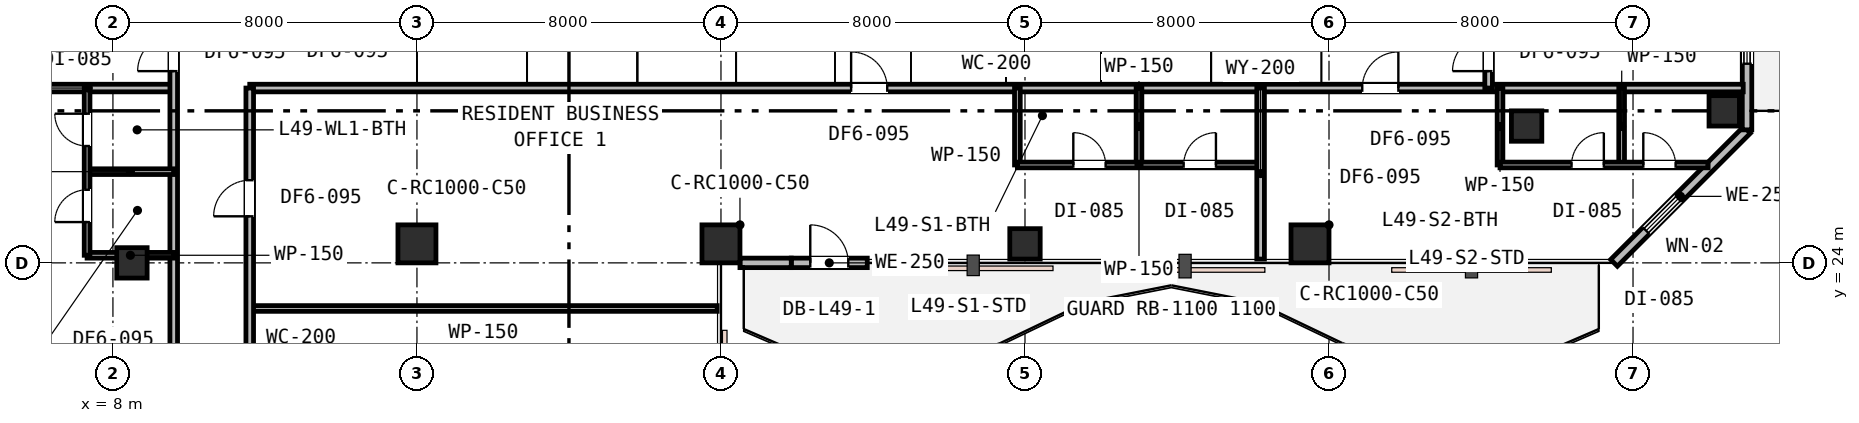
"""IFC4 building model, lengths in metres.
Left out: names, types, materials, properties, quantities, classifications, styles, units other than length and angle.
Written with IfcOpenShell. Run it as: python <this file> out.ifc"""

import sys

from ifc_helpers import new_model, si_unit, direction, frame, frame_2d, origin, origin_2d, place, context, subcontext, project, spatial, rectangle, extrude, element, fill, save


model = new_model("IFC4")
c1 = context("Model", 3, precision=1e-05, world=origin(), true_north=direction((0.0, 1.0)))
c2 = subcontext(c1, "Body", "Model", "MODEL_VIEW")
j1 = project(units=[si_unit("LENGTHUNIT", "METRE"), si_unit("PLANEANGLEUNIT", "RADIAN")], contexts=[c1])
p1 = place(None, origin())
s1 = spatial("IfcSite", under=j1, at=p1, CompositionType="ELEMENT")
p2 = place(p1, origin())
s2 = spatial("IfcBuilding", under=s1, at=p2, CompositionType="ELEMENT")
p3 = place(p2, frame((0.0, 0.0, 190.2)))
s3 = spatial("IfcBuildingStorey", under=s2, at=p3, CompositionType="ELEMENT", Elevation=190.2)
p4 = place(p3, frame((8.5, 24.0, 0.0), z_axis=(0.0, 0.0, 1.0), x_axis=(1.0, 0.0, 0.0)))
e1 = element("IfcColumn", 1, at=p4, inside=s3, PredefinedType="COLUMN", context=c2, shape_type="SweptSolid", body=[
    extrude(rectangle(XDim=0.8, YDim=0.8, at=origin_2d()), origin(), (0.0, 0.0, 1.0), 3.6),
])
for number, where, z_axis, x_axis in (
    (2, (16.0, 24.5, 0.0), (0.0, 0.0, 1.0), (1.0, 0.0, 0.0)),
    (3, (24.0, 24.5, 0.0), (0.0, 0.0, 1.0), (1.0, 0.0, 0.0)),
):
    element("IfcColumn", number, at=place(p3, frame(where, z_axis=z_axis, x_axis=x_axis)), inside=s3, PredefinedType="COLUMN", context=c2, shape_type="SweptSolid", body=[
        extrude(rectangle(XDim=1.0, YDim=1.0, at=origin_2d()), origin(), (0.0, 0.0, 1.0), 3.6),
    ])
p5 = place(p3, frame((32.0, 24.5, 0.0), z_axis=(0.0, 0.0, 1.0), x_axis=(1.0, 0.0, 0.0)))
e4 = element("IfcColumn", 4, at=p5, inside=s3, PredefinedType="COLUMN", context=c2, shape_type="SweptSolid", body=[
    extrude(rectangle(XDim=0.8, YDim=0.8, at=origin_2d()), origin(), (0.0, 0.0, 1.0), 3.6),
])
p6 = place(p3, frame((39.5, 24.5, 0.0), z_axis=(0.0, 0.0, 1.0), x_axis=(1.0, 0.0, 0.0)))
e5 = element("IfcColumn", 5, at=p6, inside=s3, PredefinedType="COLUMN", context=c2, shape_type="SweptSolid", body=[
    extrude(rectangle(XDim=1.0, YDim=1.0, at=origin_2d()), origin(), (0.0, 0.0, 1.0), 3.6),
])
for number, where, z_axis, x_axis in (
    (6, (45.2, 27.6, 0.0), (0.0, 0.0, 1.0), (1.0, 0.0, 0.0)),
    (7, (50.4, 28.0, 0.0), (0.0, 0.0, 1.0), (1.0, 0.0, 0.0)),
):
    element("IfcColumn", number, at=place(p3, frame(where, z_axis=z_axis, x_axis=x_axis)), inside=s3, PredefinedType="COLUMN", context=c2, shape_type="SweptSolid", body=[
        extrude(rectangle(XDim=0.8, YDim=0.8, at=origin_2d()), origin(), (0.0, 0.0, 1.0), 3.6),
    ])
p7 = place(p3, frame((25.85, 24.0, 0.0), z_axis=(0.0, 0.0, 1.0), x_axis=(1.0, 0.0, 0.0)))
e8 = element("IfcWall", 8, at=p7, inside=s3, PredefinedType="STANDARD", context=c2, shape_type="SweptSolid", body=[
    extrude(rectangle(XDim=2.0, YDim=0.25, at=frame_2d((1.0, 0.0))), origin(), (0.0, 0.0, 1.0), 3.02),
])
p8 = place(p7, frame((0.5, 0.0, 0.0)))
e9 = element("IfcOpeningElement", 9, at=p8, cuts=e8, PredefinedType="OPENING", context=c2, shape_type="SweptSolid", body=[
    extrude(rectangle(XDim=1.0, YDim=2.15, at=frame_2d((0.5, 1.075))), frame((0.0, 0.135, 0.0), z_axis=(0.0, -1.0, 0.0), x_axis=(1.0, 0.0, 0.0)), (0.0, 0.0, 1.0), 0.27),
])
p9 = place(p3, frame((24.5, 24.0, 0.0), z_axis=(0.0, 0.0, 1.0), x_axis=(1.0, 0.0, 0.0)))
e10 = element("IfcWall", 10, at=p9, inside=s3, PredefinedType="STANDARD", context=c2, shape_type="SweptSolid", body=[
    extrude(rectangle(XDim=1.35, YDim=0.25, at=frame_2d((0.675, 0.0))), origin(), (0.0, 0.0, 1.0), 3.02),
])
p10 = place(p3, frame((47.5, 24.0, 0.0), z_axis=(0.0, 0.0, 1.0), x_axis=(0.707106781187, 0.707106781187, 0.0)))
e11 = element("IfcWall", 11, at=p10, inside=s3, PredefinedType="STANDARD", context=c2, shape_type="SweptSolid", body=[
    extrude(rectangle(XDim=4.95, YDim=0.25, at=frame_2d((2.475, 0.0))), origin(), (0.0, 0.0, 1.0), 3.33),
])
p11 = place(p10, frame((1.196, 0.0, 0.85)))
e12 = element("IfcOpeningElement", 12, at=p11, cuts=e11, PredefinedType="OPENING", context=c2, shape_type="SweptSolid", body=[
    extrude(rectangle(XDim=1.2, YDim=1.6, at=frame_2d((0.6, 0.8))), frame((0.0, 0.135, 0.0), z_axis=(0.0, -1.0, 0.0), x_axis=(1.0, 0.0, 0.0)), (0.0, 0.0, 1.0), 0.27),
])
p12 = place(p3, frame((51.0, 27.5, 0.0), z_axis=(0.0, 0.0, 1.0), x_axis=(0.0, 1.0, 0.0)))
e13 = element("IfcWall", 13, at=p12, inside=s3, PredefinedType="STANDARD", context=c2, shape_type="SweptSolid", body=[
    extrude(rectangle(XDim=4.2, YDim=0.25, at=frame_2d((2.1, 0.0))), origin(), (0.0, 0.0, 1.0), 3.33),
])
p13 = place(p12, frame((1.74, 0.0, 0.75)))
e14 = element("IfcOpeningElement", 14, at=p13, cuts=e13, PredefinedType="OPENING", context=c2, shape_type="SweptSolid", body=[
    extrude(rectangle(XDim=1.8, YDim=1.85, at=frame_2d((0.9, 0.925))), frame((0.0, 0.135, 0.0), z_axis=(0.0, -1.0, 0.0), x_axis=(1.0, 0.0, 0.0)), (0.0, 0.0, 1.0), 0.27),
])
p14 = place(p3, frame((5.1, 28.6, 0.0), z_axis=(0.0, 0.0, 1.0), x_axis=(1.0, 0.0, 0.0)))
e15 = element("IfcWall", 15, at=p14, inside=s3, PredefinedType="PARTITIONING", context=c2, shape_type="SweptSolid", body=[
    extrude(rectangle(XDim=4.5, YDim=0.2, at=frame_2d((2.25, 0.0))), origin(), (0.0, 0.0, 1.0), 2.92),
])
p15 = place(p3, frame((11.6, 28.6, 0.0), z_axis=(0.0, 0.0, 1.0), x_axis=(1.0, 0.0, 0.0)))
e16 = element("IfcWall", 16, at=p15, inside=s3, PredefinedType="PARTITIONING", context=c2, shape_type="SweptSolid", body=[
    extrude(rectangle(XDim=39.3, YDim=0.2, at=frame_2d((19.65, 0.0))), origin(), (0.0, 0.0, 1.0), 2.92),
])
p16 = place(p15, frame((15.825, 0.0, 0.0)))
e17 = element("IfcOpeningElement", 17, at=p16, cuts=e16, PredefinedType="OPENING", context=c2, shape_type="SweptSolid", body=[
    extrude(rectangle(XDim=0.95, YDim=2.15, at=frame_2d((0.475, 1.075))), frame((0.0, 0.11, 0.0), z_axis=(0.0, -1.0, 0.0), x_axis=(1.0, 0.0, 0.0)), (0.0, 0.0, 1.0), 0.22),
])
p17 = place(p15, frame((29.275, 0.0, 0.0)))
e18 = element("IfcOpeningElement", 18, at=p17, cuts=e16, PredefinedType="OPENING", context=c2, shape_type="SweptSolid", body=[
    extrude(rectangle(XDim=0.95, YDim=2.15, at=frame_2d((0.475, 1.075))), frame((0.0, 0.11, 0.0), z_axis=(0.0, -1.0, 0.0), x_axis=(1.0, 0.0, 0.0)), (0.0, 0.0, 1.0), 0.22),
])
p18 = place(p3, frame((9.6, 17.0, 0.0), z_axis=(0.0, 0.0, 1.0), x_axis=(0.0, 1.0, 0.0)))
e19 = element("IfcWall", 19, at=p18, inside=s3, PredefinedType="PARTITIONING", context=c2, shape_type="SweptSolid", body=[
    extrude(rectangle(XDim=25.9, YDim=0.2, at=frame_2d((12.95, 0.0))), origin(), (0.0, 0.0, 1.0), 2.92),
])
p19 = place(p18, frame((12.045, 0.0, 0.0)))
e20 = element("IfcOpeningElement", 20, at=p19, cuts=e19, PredefinedType="OPENING", context=c2, shape_type="SweptSolid", body=[
    extrude(rectangle(XDim=0.95, YDim=2.15, at=frame_2d((0.475, 1.075))), frame((0.0, 0.11, 0.0), z_axis=(0.0, -1.0, 0.0), x_axis=(1.0, 0.0, 0.0)), (0.0, 0.0, 1.0), 0.22),
])
p20 = place(p18, frame((3.125, 0.0, 0.0)))
e21 = element("IfcOpeningElement", 21, at=p20, cuts=e19, PredefinedType="OPENING", context=c2, shape_type="SweptSolid", body=[
    extrude(rectangle(XDim=0.95, YDim=2.15, at=frame_2d((0.475, 1.075))), frame((0.0, 0.11, 0.0), z_axis=(0.0, -1.0, 0.0), x_axis=(1.0, 0.0, 0.0)), (0.0, 0.0, 1.0), 0.22),
])
p21 = place(p3, frame((44.2, 28.6, 0.0), z_axis=(0.0, 0.0, 1.0), x_axis=(0.0, 1.0, 0.0)))
e22 = element("IfcWall", 22, at=p21, inside=s3, PredefinedType="PARTITIONING", context=c2, shape_type="SweptSolid", body=[
    extrude(rectangle(XDim=14.3, YDim=0.2, at=frame_2d((7.15, 0.0))), origin(), (0.0, 0.0, 1.0), 2.92),
])
p22 = place(p21, frame((0.445, 0.0, 0.0)))
e23 = element("IfcOpeningElement", 23, at=p22, cuts=e22, PredefinedType="OPENING", context=c2, shape_type="SweptSolid", body=[
    extrude(rectangle(XDim=0.95, YDim=2.15, at=frame_2d((0.475, 1.075))), frame((0.0, 0.11, 0.0), z_axis=(0.0, -1.0, 0.0), x_axis=(1.0, 0.0, 0.0)), (0.0, 0.0, 1.0), 0.22),
])
p23 = place(p3, frame((31.8, 26.576, 0.0), z_axis=(0.0, 0.0, 1.0), x_axis=(0.0, 1.0, 0.0)))
e24 = element("IfcWall", 24, at=p23, inside=s3, PredefinedType="PARTITIONING", context=c2, shape_type="SweptSolid", body=[
    extrude(rectangle(XDim=2.024, YDim=0.15, at=frame_2d((1.012, 0.0))), origin(), (0.0, 0.0, 1.0), 2.92),
])
p24 = place(p3, frame((35.0, 26.576, 0.0), z_axis=(0.0, 0.0, 1.0), x_axis=(0.0, 1.0, 0.0)))
e25 = element("IfcWall", 25, at=p24, inside=s3, PredefinedType="PARTITIONING", context=c2, shape_type="SweptSolid", body=[
    extrude(rectangle(XDim=2.024, YDim=0.15, at=frame_2d((1.012, 0.0))), origin(), (0.0, 0.0, 1.0), 3.07),
])
p25 = place(p3, frame((31.8, 26.576, 0.0), z_axis=(0.0, 0.0, 1.0), x_axis=(1.0, 0.0, 0.0)))
e26 = element("IfcWall", 26, at=p25, inside=s3, PredefinedType="PARTITIONING", context=c2, shape_type="SweptSolid", body=[
    extrude(rectangle(XDim=6.4, YDim=0.15, at=frame_2d((3.2, 0.0))), origin(), (0.0, 0.0, 1.0), 2.92),
])
p26 = place(p25, frame((1.472, 0.0, 0.0)))
e27 = element("IfcOpeningElement", 27, at=p26, cuts=e26, PredefinedType="OPENING", context=c2, shape_type="SweptSolid", body=[
    extrude(rectangle(XDim=0.85, YDim=2.15, at=frame_2d((0.425, 1.075))), frame((0.0, 0.085, 0.0), z_axis=(0.0, -1.0, 0.0), x_axis=(1.0, 0.0, 0.0)), (0.0, 0.0, 1.0), 0.17),
])
p27 = place(p25, frame((4.375, 0.0, 0.0)))
e28 = element("IfcOpeningElement", 28, at=p27, cuts=e26, PredefinedType="OPENING", context=c2, shape_type="SweptSolid", body=[
    extrude(rectangle(XDim=0.85, YDim=2.15, at=frame_2d((0.425, 1.075))), frame((0.0, 0.085, 0.0), z_axis=(0.0, -1.0, 0.0), x_axis=(1.0, 0.0, 0.0)), (0.0, 0.0, 1.0), 0.17),
])
p28 = place(p3, frame((38.2, 24.1, 0.0), z_axis=(0.0, 0.0, 1.0), x_axis=(0.0, 1.0, 0.0)))
e29 = element("IfcWall", 29, at=p28, inside=s3, PredefinedType="PARTITIONING", context=c2, shape_type="SweptSolid", body=[
    extrude(rectangle(XDim=4.5, YDim=0.2, at=frame_2d((2.25, 0.0))), origin(), (0.0, 0.0, 1.0), 3.02),
])
for number, where, z_axis, x_axis in (
    (30, (44.5, 26.576, 0.0), (0.0, 0.0, 1.0), (0.0, 1.0, 0.0)),
    (31, (47.7, 26.576, 0.0), (0.0, 0.0, 1.0), (0.0, 1.0, 0.0)),
):
    element("IfcWall", number, at=place(p3, frame(where, z_axis=z_axis, x_axis=x_axis)), inside=s3, PredefinedType="PARTITIONING", context=c2, shape_type="SweptSolid", body=[
        extrude(rectangle(XDim=2.024, YDim=0.15, at=frame_2d((1.012, 0.0))), origin(), (0.0, 0.0, 1.0), 3.33),
    ])
p29 = place(p3, frame((44.5, 26.576, 0.0), z_axis=(0.0, 0.0, 1.0), x_axis=(1.0, 0.0, 0.0)))
e32 = element("IfcWall", 32, at=p29, inside=s3, PredefinedType="PARTITIONING", context=c2, shape_type="SweptSolid", body=[
    extrude(rectangle(XDim=5.476, YDim=0.15, at=frame_2d((2.738, 0.0))), origin(), (0.0, 0.0, 1.0), 3.33),
])
p30 = place(p29, frame((1.882, 0.0, 0.0)))
e33 = element("IfcOpeningElement", 33, at=p30, cuts=e32, PredefinedType="OPENING", context=c2, shape_type="SweptSolid", body=[
    extrude(rectangle(XDim=0.85, YDim=2.15, at=frame_2d((0.425, 1.075))), frame((0.0, 0.085, 0.0), z_axis=(0.0, -1.0, 0.0), x_axis=(1.0, 0.0, 0.0)), (0.0, 0.0, 1.0), 0.17),
])
p31 = place(p29, frame((3.77, 0.0, 0.0)))
e34 = element("IfcOpeningElement", 34, at=p31, cuts=e32, PredefinedType="OPENING", context=c2, shape_type="SweptSolid", body=[
    extrude(rectangle(XDim=0.85, YDim=2.15, at=frame_2d((0.425, 1.075))), frame((0.0, 0.085, 0.0), z_axis=(0.0, -1.0, 0.0), x_axis=(1.0, 0.0, 0.0)), (0.0, 0.0, 1.0), 0.17),
])
for number, where, z_axis, x_axis in (
    (35, (7.32, 24.2, 0.0), (0.0, 0.0, 1.0), (1.0, 0.0, 0.0)),
    (36, (7.32, 26.4, 0.0), (0.0, 0.0, 1.0), (1.0, 0.0, 0.0)),
):
    element("IfcWall", number, at=place(p3, frame(where, z_axis=z_axis, x_axis=x_axis)), inside=s3, PredefinedType="PARTITIONING", context=c2, shape_type="SweptSolid", body=[
        extrude(rectangle(XDim=2.28, YDim=0.15, at=frame_2d((1.14, 0.0))), origin(), (0.0, 0.0, 1.0), 2.92),
    ])
p32 = place(p3, frame((7.32, 24.2, 0.0), z_axis=(0.0, 0.0, 1.0), x_axis=(0.0, 1.0, 0.0)))
e37 = element("IfcWall", 37, at=p32, inside=s3, PredefinedType="PARTITIONING", context=c2, shape_type="SweptSolid", body=[
    extrude(rectangle(XDim=4.4, YDim=0.15, at=frame_2d((2.2, 0.0))), origin(), (0.0, 0.0, 1.0), 2.92),
])
p33 = place(p32, frame((0.873, 0.0, 0.0)))
e38 = element("IfcOpeningElement", 38, at=p33, cuts=e37, PredefinedType="OPENING", context=c2, shape_type="SweptSolid", body=[
    extrude(rectangle(XDim=0.85, YDim=2.15, at=frame_2d((0.425, 1.075))), frame((0.0, 0.085, 0.0), z_axis=(0.0, -1.0, 0.0), x_axis=(1.0, 0.0, 0.0)), (0.0, 0.0, 1.0), 0.17),
])
p34 = place(p32, frame((2.875, 0.0, 0.0)))
e39 = element("IfcOpeningElement", 39, at=p34, cuts=e37, PredefinedType="OPENING", context=c2, shape_type="SweptSolid", body=[
    extrude(rectangle(XDim=0.85, YDim=2.15, at=frame_2d((0.425, 1.075))), frame((0.0, 0.085, 0.0), z_axis=(0.0, -1.0, 0.0), x_axis=(1.0, 0.0, 0.0)), (0.0, 0.0, 1.0), 0.17),
])
p35 = place(p3, frame((11.6, 22.8, 0.0), z_axis=(0.0, 0.0, 1.0), x_axis=(1.0, 0.0, 0.0)))
e40 = element("IfcWall", 40, at=p35, inside=s3, PredefinedType="PARTITIONING", context=c2, shape_type="SweptSolid", body=[
    extrude(rectangle(XDim=12.3, YDim=0.15, at=frame_2d((6.15, 0.0))), origin(), (0.0, 0.0, 1.0), 2.92),
])
p36 = place(p3, frame((11.6, 17.0, 0.0), z_axis=(0.0, 0.0, 1.0), x_axis=(0.0, 1.0, 0.0)))
e41 = element("IfcWall", 41, at=p36, inside=s3, PredefinedType="PARTITIONING", context=c2, shape_type="SweptSolid", body=[
    extrude(rectangle(XDim=11.6, YDim=0.2, at=frame_2d((5.8, 0.0))), origin(), (0.0, 0.0, 1.0), 2.92),
])
p37 = place(p36, frame((8.225, 0.0, 0.0)))
e42 = element("IfcOpeningElement", 42, at=p37, cuts=e41, PredefinedType="OPENING", context=c2, shape_type="SweptSolid", body=[
    extrude(rectangle(XDim=0.95, YDim=2.15, at=frame_2d((0.475, 1.075))), frame((0.0, 0.11, 0.0), z_axis=(0.0, -1.0, 0.0), x_axis=(1.0, 0.0, 0.0)), (0.0, 0.0, 1.0), 0.22),
])
p38 = place(p36, frame((2.425, 0.0, 0.0)))
e43 = element("IfcOpeningElement", 43, at=p38, cuts=e41, PredefinedType="OPENING", context=c2, shape_type="SweptSolid", body=[
    extrude(rectangle(XDim=0.95, YDim=2.15, at=frame_2d((0.475, 1.075))), frame((0.0, 0.11, 0.0), z_axis=(0.0, -1.0, 0.0), x_axis=(1.0, 0.0, 0.0)), (0.0, 0.0, 1.0), 0.22),
])
p39 = place(p8, origin())
e44 = element("IfcDoor", 44, at=p39, inside=s3, OperationType="SINGLE_SWING_LEFT", PredefinedType="DOOR", context=c2, shape_type="SweptSolid", body=[
    extrude(rectangle(XDim=1.0, YDim=2.15, at=frame_2d((0.5, 1.075))), frame((0.0, 0.025, 0.0), z_axis=(0.0, -1.0, 0.0), x_axis=(1.0, 0.0, 0.0)), (0.0, 0.0, 1.0), 0.05),
])
fill(e9, e44)
p40 = place(p11, origin())
e45 = element("IfcWindow", 45, at=p40, inside=s3, PartitioningType="SINGLE_PANEL", PredefinedType="WINDOW", context=c2, shape_type="SweptSolid", body=[
    extrude(rectangle(XDim=1.2, YDim=1.6, at=frame_2d((0.6, 0.8))), frame((0.0, 0.03, 0.0), z_axis=(0.0, -1.0, 0.0), x_axis=(1.0, 0.0, 0.0)), (0.0, 0.0, 1.0), 0.06),
])
fill(e12, e45)
p41 = place(p13, origin())
e46 = element("IfcWindow", 46, at=p41, inside=s3, PartitioningType="SINGLE_PANEL", PredefinedType="WINDOW", context=c2, shape_type="SweptSolid", body=[
    extrude(rectangle(XDim=1.8, YDim=1.85, at=frame_2d((0.9, 0.925))), frame((0.0, 0.03, 0.0), z_axis=(0.0, -1.0, 0.0), x_axis=(1.0, 0.0, 0.0)), (0.0, 0.0, 1.0), 0.06),
])
fill(e14, e46)
p42 = place(p19, origin())
e47 = element("IfcDoor", 47, at=p42, inside=s3, OperationType="SINGLE_SWING_LEFT", PredefinedType="DOOR", context=c2, shape_type="SweptSolid", body=[
    extrude(rectangle(XDim=0.95, YDim=2.15, at=frame_2d((0.475, 1.075))), frame((0.0, 0.025, 0.0), z_axis=(0.0, -1.0, 0.0), x_axis=(1.0, 0.0, 0.0)), (0.0, 0.0, 1.0), 0.05),
])
fill(e20, e47)
p43 = place(p22, origin())
e48 = element("IfcDoor", 48, at=p43, inside=s3, OperationType="SINGLE_SWING_LEFT", PredefinedType="DOOR", context=c2, shape_type="SweptSolid", body=[
    extrude(rectangle(XDim=0.95, YDim=2.15, at=frame_2d((0.475, 1.075))), frame((0.0, 0.025, 0.0), z_axis=(0.0, -1.0, 0.0), x_axis=(1.0, 0.0, 0.0)), (0.0, 0.0, 1.0), 0.05),
])
fill(e23, e48)
p44 = place(p16, origin())
e49 = element("IfcDoor", 49, at=p44, inside=s3, OperationType="SINGLE_SWING_LEFT", PredefinedType="DOOR", context=c2, shape_type="SweptSolid", body=[
    extrude(rectangle(XDim=0.95, YDim=2.15, at=frame_2d((0.475, 1.075))), frame((0.0, 0.025, 0.0), z_axis=(0.0, -1.0, 0.0), x_axis=(1.0, 0.0, 0.0)), (0.0, 0.0, 1.0), 0.05),
])
fill(e17, e49)
p45 = place(p26, origin())
e50 = element("IfcDoor", 50, at=p45, inside=s3, OperationType="SINGLE_SWING_LEFT", PredefinedType="DOOR", context=c2, shape_type="SweptSolid", body=[
    extrude(rectangle(XDim=0.85, YDim=2.15, at=frame_2d((0.425, 1.075))), frame((0.0, 0.025, 0.0), z_axis=(0.0, -1.0, 0.0), x_axis=(1.0, 0.0, 0.0)), (0.0, 0.0, 1.0), 0.05),
])
fill(e27, e50)
p46 = place(p27, origin())
e51 = element("IfcDoor", 51, at=p46, inside=s3, OperationType="SINGLE_SWING_RIGHT", PredefinedType="DOOR", context=c2, shape_type="SweptSolid", body=[
    extrude(rectangle(XDim=0.85, YDim=2.15, at=frame_2d((0.425, 1.075))), frame((0.0, 0.025, 0.0), z_axis=(0.0, -1.0, 0.0), x_axis=(1.0, 0.0, 0.0)), (0.0, 0.0, 1.0), 0.05),
])
fill(e28, e51)
p47 = place(p17, origin())
e52 = element("IfcDoor", 52, at=p47, inside=s3, OperationType="SINGLE_SWING_RIGHT", PredefinedType="DOOR", context=c2, shape_type="SweptSolid", body=[
    extrude(rectangle(XDim=0.95, YDim=2.15, at=frame_2d((0.475, 1.075))), frame((0.0, 0.025, 0.0), z_axis=(0.0, -1.0, 0.0), x_axis=(1.0, 0.0, 0.0)), (0.0, 0.0, 1.0), 0.05),
])
fill(e18, e52)
p48 = place(p30, origin())
e53 = element("IfcDoor", 53, at=p48, inside=s3, OperationType="SINGLE_SWING_RIGHT", PredefinedType="DOOR", context=c2, shape_type="SweptSolid", body=[
    extrude(rectangle(XDim=0.85, YDim=2.15, at=frame_2d((0.425, 1.075))), frame((0.0, 0.025, 0.0), z_axis=(0.0, -1.0, 0.0), x_axis=(1.0, 0.0, 0.0)), (0.0, 0.0, 1.0), 0.05),
])
fill(e33, e53)
p49 = place(p31, origin())
e54 = element("IfcDoor", 54, at=p49, inside=s3, OperationType="SINGLE_SWING_LEFT", PredefinedType="DOOR", context=c2, shape_type="SweptSolid", body=[
    extrude(rectangle(XDim=0.85, YDim=2.15, at=frame_2d((0.425, 1.075))), frame((0.0, 0.025, 0.0), z_axis=(0.0, -1.0, 0.0), x_axis=(1.0, 0.0, 0.0)), (0.0, 0.0, 1.0), 0.05),
])
fill(e34, e54)
p50 = place(p33, origin())
e55 = element("IfcDoor", 55, at=p50, inside=s3, OperationType="SINGLE_SWING_LEFT", PredefinedType="DOOR", context=c2, shape_type="SweptSolid", body=[
    extrude(rectangle(XDim=0.85, YDim=2.15, at=frame_2d((0.425, 1.075))), frame((0.0, 0.025, 0.0), z_axis=(0.0, -1.0, 0.0), x_axis=(1.0, 0.0, 0.0)), (0.0, 0.0, 1.0), 0.05),
])
fill(e38, e55)
p51 = place(p34, origin())
e56 = element("IfcDoor", 56, at=p51, inside=s3, OperationType="SINGLE_SWING_RIGHT", PredefinedType="DOOR", context=c2, shape_type="SweptSolid", body=[
    extrude(rectangle(XDim=0.85, YDim=2.15, at=frame_2d((0.425, 1.075))), frame((0.0, 0.025, 0.0), z_axis=(0.0, -1.0, 0.0), x_axis=(1.0, 0.0, 0.0)), (0.0, 0.0, 1.0), 0.05),
])
fill(e39, e56)
p52 = place(p37, origin())
e57 = element("IfcDoor", 57, at=p52, inside=s3, OperationType="SINGLE_SWING_LEFT", PredefinedType="DOOR", context=c2, shape_type="SweptSolid", body=[
    extrude(rectangle(XDim=0.95, YDim=2.15, at=frame_2d((0.475, 1.075))), frame((0.0, 0.025, 0.0), z_axis=(0.0, -1.0, 0.0), x_axis=(1.0, 0.0, 0.0)), (0.0, 0.0, 1.0), 0.05),
])
fill(e42, e57)
save(model, sys.argv[1])
